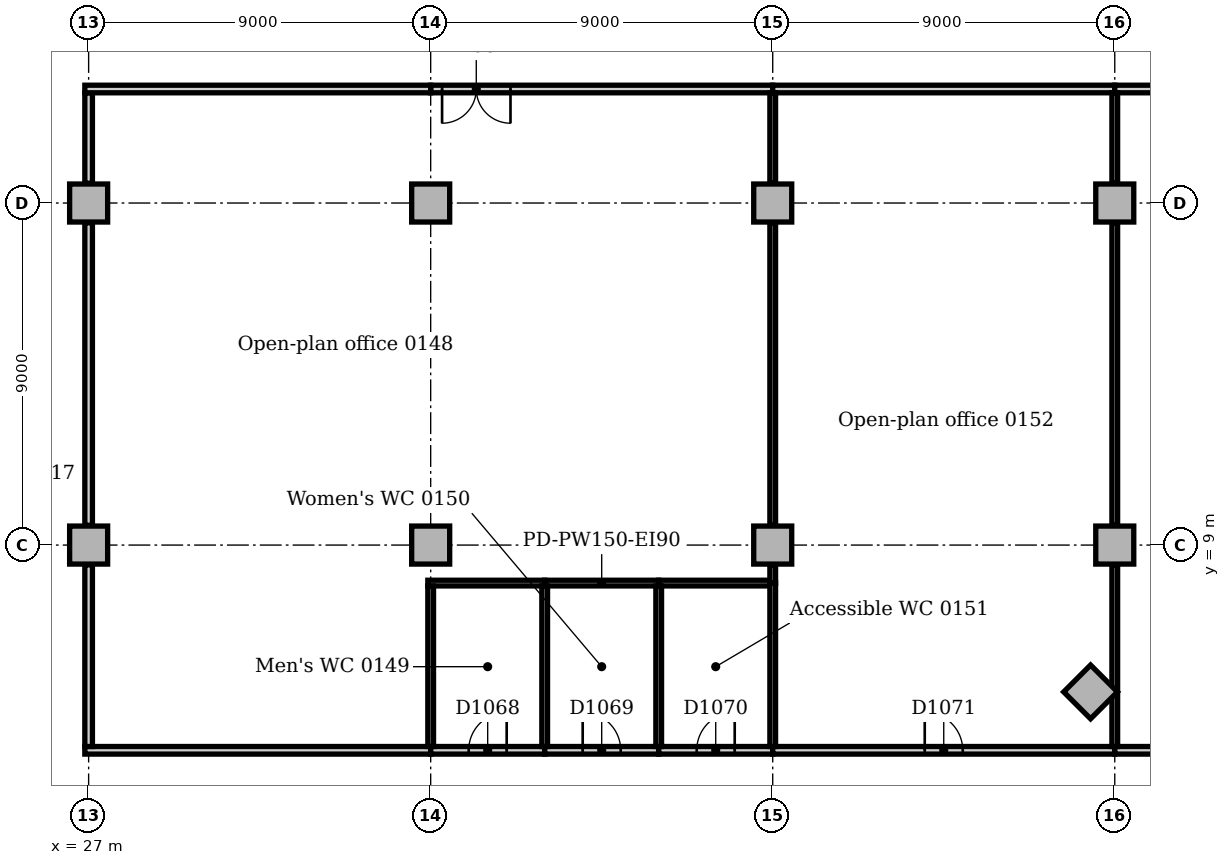
"""IFC4 building model, lengths in metres.
Left out: names, types, materials, properties, quantities, classifications, styles, units other than length and angle.
Written with IfcOpenShell. Run it as: python <this file> out.ifc"""

import sys

from ifc_helpers import new_model, si_unit, direction, frame, frame_2d, origin, origin_2d, place, context, subcontext, project, spatial, rectangle, extrude, element, fill, save


model = new_model("IFC4")
c1 = context("Model", 3, precision=1e-05, world=origin(), true_north=direction((0.0, 1.0)))
c2 = subcontext(c1, "Body", "Model", "MODEL_VIEW")
j1 = project(units=[si_unit("LENGTHUNIT", "METRE"), si_unit("PLANEANGLEUNIT", "RADIAN")], contexts=[c1])
p1 = place(None, origin())
s1 = spatial("IfcSite", under=j1, at=p1, CompositionType="ELEMENT")
p2 = place(p1, origin())
s2 = spatial("IfcBuilding", under=s1, at=p2, CompositionType="ELEMENT")
p3 = place(p2, frame((0.0, 0.0, 6.0)))
s3 = spatial("IfcBuildingStorey", under=s2, at=p3, CompositionType="ELEMENT", Elevation=6.0)
for number, where, z_axis, x_axis in (
    (1, (53.364, 5.136, 0.0), (0.0, 0.0, 1.0), (0.707, 0.707, 0.0)),
    (2, (27.0, 9.0, 0.0), (0.0, 0.0, 1.0), (1.0, 0.0, 0.0)),
    (3, (27.0, 18.0, 0.0), (0.0, 0.0, 1.0), (1.0, 0.0, 0.0)),
    (4, (36.0, 9.0, 0.0), (0.0, 0.0, 1.0), (1.0, 0.0, 0.0)),
    (5, (36.0, 18.0, 0.0), (0.0, 0.0, 1.0), (1.0, 0.0, 0.0)),
    (6, (45.0, 9.0, 0.0), (0.0, 0.0, 1.0), (1.0, 0.0, 0.0)),
    (7, (45.0, 18.0, 0.0), (0.0, 0.0, 1.0), (1.0, 0.0, 0.0)),
    (8, (54.0, 9.0, 0.0), (0.0, 0.0, 1.0), (1.0, 0.0, 0.0)),
    (9, (54.0, 18.0, 0.0), (0.0, 0.0, 1.0), (1.0, 0.0, 0.0)),
):
    element("IfcColumn", number, at=place(p3, frame(where, z_axis=z_axis, x_axis=x_axis)), inside=s3, PredefinedType="COLUMN", context=c2, shape_type="SweptSolid", body=[
        extrude(rectangle(XDim=1.0, YDim=1.0, at=origin_2d()), origin(), (0.0, 0.0, 1.0), 4.7),
    ])
p4 = place(p3, frame((26.9, 3.6, 0.0), z_axis=(0.0, 0.0, 1.0), x_axis=(1.0, 0.0, 0.0)))
e10 = element("IfcWall", 10, at=p4, inside=s3, PredefinedType="PARTITIONING", context=c2, shape_type="SweptSolid", body=[
    extrude(rectangle(XDim=9.1, YDim=0.2, at=frame_2d((4.55, 0.0))), origin(), (0.0, 0.0, 1.0), 4.7),
])
p5 = place(p3, frame((36.0, 3.6, 0.0), z_axis=(0.0, 0.0, 1.0), x_axis=(1.0, 0.0, 0.0)))
e11 = element("IfcWall", 11, at=p5, inside=s3, PredefinedType="PARTITIONING", context=c2, shape_type="SweptSolid", body=[
    extrude(rectangle(XDim=3.0, YDim=0.2, at=frame_2d((1.5, 0.0))), origin(), (0.0, 0.0, 1.0), 4.7),
])
p6 = place(p5, frame((1.0, 0.0, 0.0)))
e12 = element("IfcOpeningElement", 12, at=p6, cuts=e11, PredefinedType="OPENING", context=c2, shape_type="SweptSolid", body=[
    extrude(rectangle(XDim=1.0, YDim=2.1, at=frame_2d((0.5, 1.05))), frame((0.0, 0.11, 0.0), z_axis=(0.0, -1.0, 0.0), x_axis=(1.0, 0.0, 0.0)), (0.0, 0.0, 1.0), 0.22),
])
p7 = place(p3, frame((39.0, 3.6, 0.0), z_axis=(0.0, 0.0, 1.0), x_axis=(1.0, 0.0, 0.0)))
e13 = element("IfcWall", 13, at=p7, inside=s3, PredefinedType="PARTITIONING", context=c2, shape_type="SweptSolid", body=[
    extrude(rectangle(XDim=3.0, YDim=0.2, at=frame_2d((1.5, 0.0))), origin(), (0.0, 0.0, 1.0), 4.7),
])
p8 = place(p7, frame((1.0, 0.0, 0.0)))
e14 = element("IfcOpeningElement", 14, at=p8, cuts=e13, PredefinedType="OPENING", context=c2, shape_type="SweptSolid", body=[
    extrude(rectangle(XDim=1.0, YDim=2.1, at=frame_2d((0.5, 1.05))), frame((0.0, 0.11, 0.0), z_axis=(0.0, -1.0, 0.0), x_axis=(1.0, 0.0, 0.0)), (0.0, 0.0, 1.0), 0.22),
])
p9 = place(p3, frame((42.0, 3.6, 0.0), z_axis=(0.0, 0.0, 1.0), x_axis=(1.0, 0.0, 0.0)))
e15 = element("IfcWall", 15, at=p9, inside=s3, PredefinedType="PARTITIONING", context=c2, shape_type="SweptSolid", body=[
    extrude(rectangle(XDim=3.0, YDim=0.2, at=frame_2d((1.5, 0.0))), origin(), (0.0, 0.0, 1.0), 4.7),
])
p10 = place(p9, frame((1.0, 0.0, 0.0)))
e16 = element("IfcOpeningElement", 16, at=p10, cuts=e15, PredefinedType="OPENING", context=c2, shape_type="SweptSolid", body=[
    extrude(rectangle(XDim=1.0, YDim=2.1, at=frame_2d((0.5, 1.05))), frame((0.0, 0.11, 0.0), z_axis=(0.0, -1.0, 0.0), x_axis=(1.0, 0.0, 0.0)), (0.0, 0.0, 1.0), 0.22),
])
p11 = place(p3, frame((45.0, 3.6, 0.0), z_axis=(0.0, 0.0, 1.0), x_axis=(1.0, 0.0, 0.0)))
e17 = element("IfcWall", 17, at=p11, inside=s3, PredefinedType="PARTITIONING", context=c2, shape_type="SweptSolid", body=[
    extrude(rectangle(XDim=9.0, YDim=0.2, at=frame_2d((4.5, 0.0))), origin(), (0.0, 0.0, 1.0), 4.7),
])
p12 = place(p11, frame((4.0, 0.0, 0.0)))
e18 = element("IfcOpeningElement", 18, at=p12, cuts=e17, PredefinedType="OPENING", context=c2, shape_type="SweptSolid", body=[
    extrude(rectangle(XDim=1.0, YDim=2.1, at=frame_2d((0.5, 1.05))), frame((0.0, 0.11, 0.0), z_axis=(0.0, -1.0, 0.0), x_axis=(1.0, 0.0, 0.0)), (0.0, 0.0, 1.0), 0.22),
])
p13 = place(p3, frame((54.0, 3.6, 0.0), z_axis=(0.0, 0.0, 1.0), x_axis=(1.0, 0.0, 0.0)))
e19 = element("IfcWall", 19, at=p13, inside=s3, PredefinedType="PARTITIONING", context=c2, shape_type="SweptSolid", body=[
    extrude(rectangle(XDim=11.6, YDim=0.2, at=frame_2d((5.8, 0.0))), origin(), (0.0, 0.0, 1.0), 4.7),
])
p14 = place(p13, frame((5.5, 0.0, 0.0)))
e20 = element("IfcOpeningElement", 20, at=p14, cuts=e19, PredefinedType="OPENING", context=c2, shape_type="SweptSolid", body=[
    extrude(rectangle(XDim=1.0, YDim=2.1, at=frame_2d((0.5, 1.05))), frame((0.0, 0.11, 0.0), z_axis=(0.0, -1.0, 0.0), x_axis=(1.0, 0.0, 0.0)), (0.0, 0.0, 1.0), 0.22),
])
p15 = place(p3, frame((27.0, 3.7, 0.0), z_axis=(0.0, 0.0, 1.0), x_axis=(0.0, 1.0, 0.0)))
e21 = element("IfcWall", 21, at=p15, inside=s3, PredefinedType="PARTITIONING", context=c2, shape_type="SweptSolid", body=[
    extrude(rectangle(XDim=4.78, YDim=0.2, at=frame_2d((2.39, 0.0))), origin(), (0.0, 0.0, 1.0), 4.7),
])
p16 = place(p3, frame((27.0, 9.52, 0.0), z_axis=(0.0, 0.0, 1.0), x_axis=(0.0, 1.0, 0.0)))
e22 = element("IfcWall", 22, at=p16, inside=s3, PredefinedType="PARTITIONING", context=c2, shape_type="SweptSolid", body=[
    extrude(rectangle(XDim=7.96, YDim=0.2, at=frame_2d((3.98, 0.0))), origin(), (0.0, 0.0, 1.0), 4.7),
])
p17 = place(p3, frame((27.0, 18.52, 0.0), z_axis=(0.0, 0.0, 1.0), x_axis=(0.0, 1.0, 0.0)))
e23 = element("IfcWall", 23, at=p17, inside=s3, PredefinedType="PARTITIONING", context=c2, shape_type="SweptSolid", body=[
    extrude(rectangle(XDim=2.38, YDim=0.2, at=frame_2d((1.19, 0.0))), origin(), (0.0, 0.0, 1.0), 4.7),
])
p18 = place(p3, frame((36.0, 21.0, 0.0), z_axis=(0.0, 0.0, 1.0), x_axis=(1.0, 0.0, 0.0)))
e24 = element("IfcWall", 24, at=p18, inside=s3, PredefinedType="PARTITIONING", context=c2, shape_type="SweptSolid", body=[
    extrude(rectangle(XDim=9.0, YDim=0.2, at=frame_2d((4.5, 0.0))), origin(), (0.0, 0.0, 1.0), 4.7),
])
p19 = place(p18, frame((0.3, 0.0, 0.0)))
e25 = element("IfcOpeningElement", 25, at=p19, cuts=e24, PredefinedType="OPENING", context=c2, shape_type="SweptSolid", body=[
    extrude(rectangle(XDim=1.8, YDim=2.1, at=frame_2d((0.9, 1.05))), frame((0.0, 0.11, 0.0), z_axis=(0.0, -1.0, 0.0), x_axis=(1.0, 0.0, 0.0)), (0.0, 0.0, 1.0), 0.22),
])
p20 = place(p3, frame((26.9, 21.0, 0.0), z_axis=(0.0, 0.0, 1.0), x_axis=(1.0, 0.0, 0.0)))
e26 = element("IfcWall", 26, at=p20, inside=s3, PredefinedType="PARTITIONING", context=c2, shape_type="SweptSolid", body=[
    extrude(rectangle(XDim=9.1, YDim=0.2, at=frame_2d((4.55, 0.0))), origin(), (0.0, 0.0, 1.0), 4.7),
])
p21 = place(p3, frame((45.0, 21.0, 0.0), z_axis=(0.0, 0.0, 1.0), x_axis=(1.0, 0.0, 0.0)))
e27 = element("IfcWall", 27, at=p21, inside=s3, PredefinedType="PARTITIONING", context=c2, shape_type="SweptSolid", body=[
    extrude(rectangle(XDim=9.0, YDim=0.2, at=frame_2d((4.5, 0.0))), origin(), (0.0, 0.0, 1.0), 4.7),
])
p22 = place(p3, frame((54.0, 21.0, 0.0), z_axis=(0.0, 0.0, 1.0), x_axis=(1.0, 0.0, 0.0)))
e28 = element("IfcWall", 28, at=p22, inside=s3, PredefinedType="PARTITIONING", context=c2, shape_type="SweptSolid", body=[
    extrude(rectangle(XDim=11.6, YDim=0.2, at=frame_2d((5.8, 0.0))), origin(), (0.0, 0.0, 1.0), 4.7),
])
p23 = place(p3, frame((35.925, 8.0, 0.0), z_axis=(0.0, 0.0, 1.0), x_axis=(1.0, 0.0, 0.0)))
e29 = element("IfcWall", 29, at=p23, inside=s3, PredefinedType="PARTITIONING", context=c2, shape_type="SweptSolid", body=[
    extrude(rectangle(XDim=3.075, YDim=0.15, at=frame_2d((1.538, 0.0))), origin(), (0.0, 0.0, 1.0), 4.7),
])
p24 = place(p3, frame((36.0, 3.7, 0.0), z_axis=(0.0, 0.0, 1.0), x_axis=(0.0, 1.0, 0.0)))
e30 = element("IfcWall", 30, at=p24, inside=s3, PredefinedType="PARTITIONING", context=c2, shape_type="SweptSolid", body=[
    extrude(rectangle(XDim=4.225, YDim=0.15, at=frame_2d((2.112, 0.0))), origin(), (0.0, 0.0, 1.0), 4.7),
])
p25 = place(p3, frame((39.0, 8.0, 0.0), z_axis=(0.0, 0.0, 1.0), x_axis=(1.0, 0.0, 0.0)))
e31 = element("IfcWall", 31, at=p25, inside=s3, PredefinedType="PARTITIONING", context=c2, shape_type="SweptSolid", body=[
    extrude(rectangle(XDim=3.0, YDim=0.15, at=frame_2d((1.5, 0.0))), origin(), (0.0, 0.0, 1.0), 4.7),
])
p26 = place(p3, frame((42.0, 8.0, 0.0), z_axis=(0.0, 0.0, 1.0), x_axis=(1.0, 0.0, 0.0)))
e32 = element("IfcWall", 32, at=p26, inside=s3, PredefinedType="PARTITIONING", context=c2, shape_type="SweptSolid", body=[
    extrude(rectangle(XDim=2.925, YDim=0.15, at=frame_2d((1.462, 0.0))), origin(), (0.0, 0.0, 1.0), 4.7),
])
p27 = place(p3, frame((45.0, 8.0, 0.0), z_axis=(0.0, 0.0, 1.0), x_axis=(0.0, 1.0, 0.0)))
e33 = element("IfcWall", 33, at=p27, inside=s3, PredefinedType="PARTITIONING", context=c2, shape_type="SweptSolid", body=[
    extrude(rectangle(XDim=0.48, YDim=0.15, at=frame_2d((0.24, 0.0))), origin(), (0.0, 0.0, 1.0), 4.7),
])
p28 = place(p3, frame((45.0, 9.52, 0.0), z_axis=(0.0, 0.0, 1.0), x_axis=(0.0, 1.0, 0.0)))
e34 = element("IfcWall", 34, at=p28, inside=s3, PredefinedType="PARTITIONING", context=c2, shape_type="SweptSolid", body=[
    extrude(rectangle(XDim=7.96, YDim=0.15, at=frame_2d((3.98, 0.0))), origin(), (0.0, 0.0, 1.0), 4.7),
])
p29 = place(p3, frame((45.0, 18.52, 0.0), z_axis=(0.0, 0.0, 1.0), x_axis=(0.0, 1.0, 0.0)))
e35 = element("IfcWall", 35, at=p29, inside=s3, PredefinedType="PARTITIONING", context=c2, shape_type="SweptSolid", body=[
    extrude(rectangle(XDim=2.38, YDim=0.15, at=frame_2d((1.19, 0.0))), origin(), (0.0, 0.0, 1.0), 4.7),
])
for number, where, z_axis, x_axis in (
    (36, (39.0, 3.7, 0.0), (0.0, 0.0, 1.0), (0.0, 1.0, 0.0)),
    (37, (42.0, 3.7, 0.0), (0.0, 0.0, 1.0), (0.0, 1.0, 0.0)),
):
    element("IfcWall", number, at=place(p3, frame(where, z_axis=z_axis, x_axis=x_axis)), inside=s3, PredefinedType="PARTITIONING", context=c2, shape_type="SweptSolid", body=[
        extrude(rectangle(XDim=4.225, YDim=0.15, at=frame_2d((2.112, 0.0))), origin(), (0.0, 0.0, 1.0), 4.7),
    ])
p30 = place(p3, frame((45.0, 3.7, 0.0), z_axis=(0.0, 0.0, 1.0), x_axis=(0.0, 1.0, 0.0)))
e38 = element("IfcWall", 38, at=p30, inside=s3, PredefinedType="PARTITIONING", context=c2, shape_type="SweptSolid", body=[
    extrude(rectangle(XDim=4.3, YDim=0.15, at=frame_2d((2.15, 0.0))), origin(), (0.0, 0.0, 1.0), 4.7),
])
p31 = place(p3, frame((54.0, 3.7, 0.0), z_axis=(0.0, 0.0, 1.0), x_axis=(0.0, 1.0, 0.0)))
e39 = element("IfcWall", 39, at=p31, inside=s3, PredefinedType="PARTITIONING", context=c2, shape_type="SweptSolid", body=[
    extrude(rectangle(XDim=4.78, YDim=0.15, at=frame_2d((2.39, 0.0))), origin(), (0.0, 0.0, 1.0), 4.7),
])
p32 = place(p3, frame((54.0, 9.52, 0.0), z_axis=(0.0, 0.0, 1.0), x_axis=(0.0, 1.0, 0.0)))
e40 = element("IfcWall", 40, at=p32, inside=s3, PredefinedType="PARTITIONING", context=c2, shape_type="SweptSolid", body=[
    extrude(rectangle(XDim=7.96, YDim=0.15, at=frame_2d((3.98, 0.0))), origin(), (0.0, 0.0, 1.0), 4.7),
])
p33 = place(p3, frame((54.0, 18.52, 0.0), z_axis=(0.0, 0.0, 1.0), x_axis=(0.0, 1.0, 0.0)))
e41 = element("IfcWall", 41, at=p33, inside=s3, PredefinedType="PARTITIONING", context=c2, shape_type="SweptSolid", body=[
    extrude(rectangle(XDim=2.38, YDim=0.15, at=frame_2d((1.19, 0.0))), origin(), (0.0, 0.0, 1.0), 4.7),
])
p34 = place(p19, frame((1.8, 0.0, 0.0), z_axis=(0.0, 0.0, 1.0), x_axis=(-1.0, 0.0, 0.0)))
e42 = element("IfcDoor", 42, at=p34, inside=s3, OperationType="DOUBLE_DOOR_SINGLE_SWING", PredefinedType="DOOR", context=c2, shape_type="SweptSolid", body=[
    extrude(rectangle(XDim=1.8, YDim=2.1, at=frame_2d((0.9, 1.05))), frame((0.0, 0.025, 0.0), z_axis=(0.0, -1.0, 0.0), x_axis=(1.0, 0.0, 0.0)), (0.0, 0.0, 1.0), 0.05),
])
fill(e25, e42)
p35 = place(p6, origin())
e43 = element("IfcDoor", 43, at=p35, inside=s3, OperationType="SINGLE_SWING_RIGHT", PredefinedType="DOOR", context=c2, shape_type="SweptSolid", body=[
    extrude(rectangle(XDim=1.0, YDim=2.1, at=frame_2d((0.5, 1.05))), frame((0.0, 0.025, 0.0), z_axis=(0.0, -1.0, 0.0), x_axis=(1.0, 0.0, 0.0)), (0.0, 0.0, 1.0), 0.05),
])
fill(e12, e43)
p36 = place(p8, origin())
e44 = element("IfcDoor", 44, at=p36, inside=s3, OperationType="SINGLE_SWING_LEFT", PredefinedType="DOOR", context=c2, shape_type="SweptSolid", body=[
    extrude(rectangle(XDim=1.0, YDim=2.1, at=frame_2d((0.5, 1.05))), frame((0.0, 0.025, 0.0), z_axis=(0.0, -1.0, 0.0), x_axis=(1.0, 0.0, 0.0)), (0.0, 0.0, 1.0), 0.05),
])
fill(e14, e44)
p37 = place(p10, origin())
e45 = element("IfcDoor", 45, at=p37, inside=s3, OperationType="SINGLE_SWING_RIGHT", PredefinedType="DOOR", context=c2, shape_type="SweptSolid", body=[
    extrude(rectangle(XDim=1.0, YDim=2.1, at=frame_2d((0.5, 1.05))), frame((0.0, 0.025, 0.0), z_axis=(0.0, -1.0, 0.0), x_axis=(1.0, 0.0, 0.0)), (0.0, 0.0, 1.0), 0.05),
])
fill(e16, e45)
p38 = place(p12, origin())
e46 = element("IfcDoor", 46, at=p38, inside=s3, OperationType="SINGLE_SWING_LEFT", PredefinedType="DOOR", context=c2, shape_type="SweptSolid", body=[
    extrude(rectangle(XDim=1.0, YDim=2.1, at=frame_2d((0.5, 1.05))), frame((0.0, 0.025, 0.0), z_axis=(0.0, -1.0, 0.0), x_axis=(1.0, 0.0, 0.0)), (0.0, 0.0, 1.0), 0.05),
])
fill(e18, e46)
save(model, sys.argv[1])
